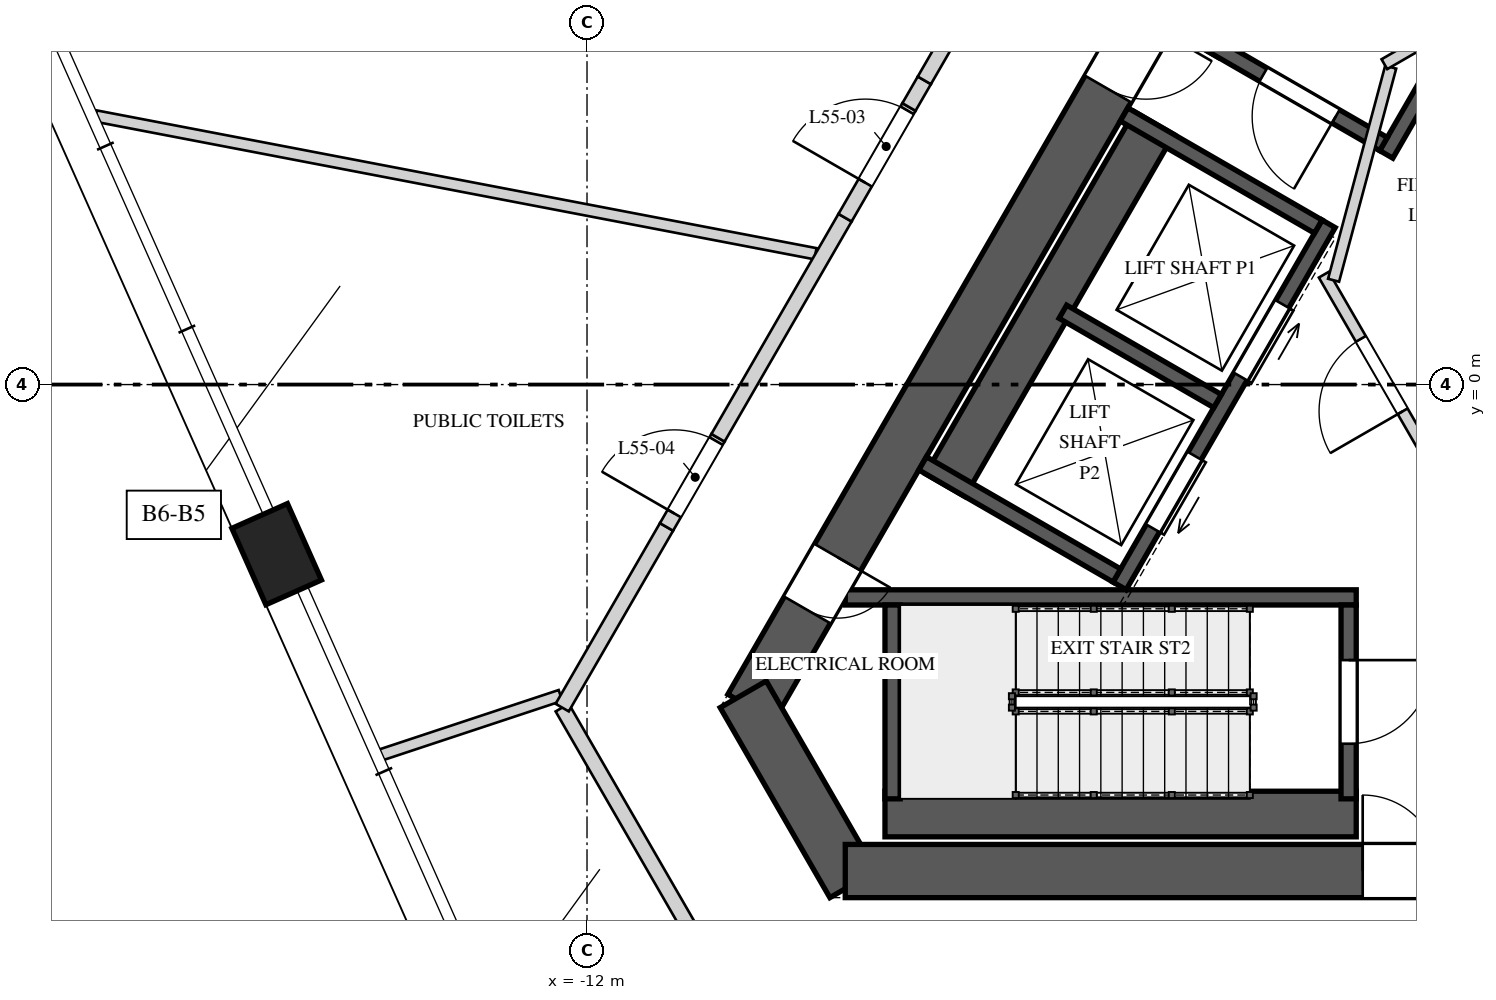
"""IFC4 building model, lengths in metres.
Left out: names, types, materials, properties, quantities, classifications, styles, units other than length and angle.
Written with IfcOpenShell. Run it as: python <this file> out.ifc"""

import sys

from ifc_helpers import new_model, si_unit, direction, frame, frame_2d, origin, origin_2d, place, context, subcontext, project, spatial, polyline, rectangle, outline, extrude, element, fill, save


model = new_model("IFC4")
c1 = context("Model", 3, precision=1e-05, world=origin(), true_north=direction((0.0, 1.0)))
c2 = subcontext(c1, "Body", "Model", "MODEL_VIEW")
j1 = project(units=[si_unit("LENGTHUNIT", "METRE"), si_unit("PLANEANGLEUNIT", "RADIAN")], contexts=[c1])
p1 = place(None, origin())
s1 = spatial("IfcSite", under=j1, at=p1, CompositionType="ELEMENT")
p2 = place(p1, origin())
s2 = spatial("IfcBuilding", under=s1, at=p2, CompositionType="ELEMENT")
p3 = place(p2, frame((0.0, 0.0, 237.2)))
s3 = spatial("IfcBuildingStorey", under=s2, at=p3, CompositionType="ELEMENT", Elevation=237.2)
p4 = place(p3, frame((-1.241, 10.65, 0.0), z_axis=(0.0, 0.0, 1.0), x_axis=(-0.500003331888, -0.866023480109, 0.0)))
e1 = element("IfcWall", 1, at=p4, inside=s3, PredefinedType="SHEAR", context=c2, shape_type="SweptSolid", body=[
    extrude(rectangle(XDim=17.205, YDim=0.7, at=frame_2d((8.603, 0.0))), origin(), (0.0, 0.0, 1.0), 4.0),
])
p5 = place(p4, frame((6.808, 0.0, 0.0)))
e2 = element("IfcOpeningElement", 2, at=p5, cuts=e1, PredefinedType="OPENING", context=c2, shape_type="SweptSolid", body=[
    extrude(rectangle(XDim=1.0, YDim=2.4, at=frame_2d((0.5, 1.2))), frame((0.0, 0.36, 0.0), z_axis=(0.0, -1.0, 0.0), x_axis=(1.0, 0.0, 0.0)), (0.0, 0.0, 1.0), 0.72),
])
p6 = place(p4, frame((14.922, 0.0, 0.0)))
e3 = element("IfcOpeningElement", 3, at=p6, cuts=e1, PredefinedType="OPENING", context=c2, shape_type="SweptSolid", body=[
    extrude(rectangle(XDim=0.8, YDim=2.1, at=frame_2d((0.4, 1.05))), frame((0.0, 0.36, 0.0), z_axis=(0.0, -1.0, 0.0), x_axis=(1.0, 0.0, 0.0)), (0.0, 0.0, 1.0), 0.72),
])
p7 = place(p3, frame((-9.945, -4.075, 0.0), z_axis=(0.0, 0.0, 1.0), x_axis=(0.499995765644, -0.866027848477, 0.0)))
e4 = element("IfcWall", 4, at=p7, inside=s3, PredefinedType="SHEAR", context=c2, shape_type="SweptSolid", body=[
    extrude(rectangle(XDim=2.887, YDim=0.7, at=frame_2d((1.443, 0.0))), origin(), (0.0, 0.0, 1.0), 4.0),
])
p8 = place(p3, frame((-8.603, -6.4, 0.0), z_axis=(0.0, 0.0, 1.0), x_axis=(1.0, 0.0, 0.0)))
e5 = element("IfcWall", 5, at=p8, inside=s3, PredefinedType="SHEAR", context=c2, shape_type="SweptSolid", body=[
    extrude(rectangle(XDim=17.205, YDim=0.7, at=frame_2d((8.603, 0.0))), origin(), (0.0, 0.0, 1.0), 4.0),
])
p9 = place(p8, frame((6.808, 0.0, 0.0)))
e6 = element("IfcOpeningElement", 6, at=p9, cuts=e5, PredefinedType="OPENING", context=c2, shape_type="SweptSolid", body=[
    extrude(rectangle(XDim=1.0, YDim=2.4, at=frame_2d((0.5, 1.2))), frame((0.0, 0.36, 0.0), z_axis=(0.0, -1.0, 0.0), x_axis=(1.0, 0.0, 0.0)), (0.0, 0.0, 1.0), 0.72),
])
p10 = place(p8, frame((14.922, 0.0, 0.0)))
e7 = element("IfcOpeningElement", 7, at=p10, cuts=e5, PredefinedType="OPENING", context=c2, shape_type="SweptSolid", body=[
    extrude(rectangle(XDim=0.8, YDim=2.1, at=frame_2d((0.4, 1.05))), frame((0.0, 0.36, 0.0), z_axis=(0.0, -1.0, 0.0), x_axis=(1.0, 0.0, 0.0)), (0.0, 0.0, 1.0), 0.72),
])
p11 = place(p3, frame((-16.083, -2.231, -0.35), z_axis=(0.0, 0.0, 1.0), x_axis=(0.406736643076, -0.913545457643, 0.0)))
e8 = element("IfcColumn", 8, at=p11, inside=s3, PredefinedType="COLUMN", context=c2, shape_type="SweptSolid", body=[
    extrude(rectangle(XDim=1.1, YDim=0.8, at=origin_2d()), origin(), (0.0, 0.0, 1.0), 4.35),
])
p12 = place(p3, frame((-0.853, 9.823, 0.0), z_axis=(0.0, 0.0, 1.0), x_axis=(-0.500009909098, -0.866019682689, 0.0)))
e9 = element("IfcWall", 9, at=p12, inside=s3, PredefinedType="SOLIDWALL", context=c2, shape_type="SweptSolid", body=[
    extrude(rectangle(XDim=6.2, YDim=0.6, at=frame_2d((3.1, 0.0))), origin(), (0.0, 0.0, 1.0), 3.65),
])
p13 = place(p3, frame((1.876, 8.85, 0.0), z_axis=(0.0, 0.0, 1.0), x_axis=(-0.499998042495, -0.866026533947, 0.0)))
e10 = element("IfcWall", 10, at=p13, inside=s3, PredefinedType="SOLIDWALL", context=c2, shape_type="SweptSolid", body=[
    extrude(rectangle(XDim=6.723, YDim=0.2, at=frame_2d((3.361, 0.0))), origin(), (0.0, 0.0, 1.0), 3.65),
])
p14 = place(p3, frame((-1.521, 3.165, 0.0), z_axis=(0.0, 0.0, 1.0), x_axis=(-0.866035871367, 0.499981869177, 0.0)))
e11 = element("IfcWall", 11, at=p14, inside=s3, PredefinedType="SOLIDWALL", context=c2, shape_type="SweptSolid", body=[
    extrude(rectangle(XDim=3.15, YDim=0.2, at=frame_2d((1.575, 0.0))), origin(), (0.0, 0.0, 1.0), 3.65),
])
p15 = place(p14, frame((0.725, 0.0, 0.0)))
e12 = element("IfcOpeningElement", 12, at=p15, cuts=e11, PredefinedType="OPENING", context=c2, shape_type="SweptSolid", body=[
    extrude(rectangle(XDim=1.1, YDim=2.4, at=frame_2d((0.55, 1.2))), frame((0.0, 0.11, 0.0), z_axis=(0.0, -1.0, 0.0), x_axis=(1.0, 0.0, 0.0)), (0.0, 0.0, 1.0), 0.22),
])
p16 = place(p3, frame((-8.08, -5.65, 0.0), z_axis=(0.0, 0.0, 1.0), x_axis=(1.0, 0.0, 0.0)))
e13 = element("IfcWall", 13, at=p16, inside=s3, PredefinedType="SOLIDWALL", context=c2, shape_type="SweptSolid", body=[
    extrude(rectangle(XDim=6.2, YDim=0.6, at=frame_2d((3.1, 0.0))), origin(), (0.0, 0.0, 1.0), 3.65),
])
p17 = place(p3, frame((-8.603, -2.8, 0.0), z_axis=(0.0, 0.0, 1.0), x_axis=(1.0, 0.0, 0.0)))
e14 = element("IfcWall", 14, at=p17, inside=s3, PredefinedType="SOLIDWALL", context=c2, shape_type="SweptSolid", body=[
    extrude(rectangle(XDim=6.723, YDim=0.2, at=frame_2d((3.361, 0.0))), origin(), (0.0, 0.0, 1.0), 3.65),
])
p18 = place(p3, frame((-7.98, -2.9, 0.0), z_axis=(0.0, 0.0, 1.0), x_axis=(0.0, -1.0, 0.0)))
e15 = element("IfcWall", 15, at=p18, inside=s3, PredefinedType="SOLIDWALL", context=c2, shape_type="SweptSolid", body=[
    extrude(rectangle(XDim=2.55, YDim=0.2, at=frame_2d((1.275, 0.0))), origin(), (0.0, 0.0, 1.0), 3.65),
])
p19 = place(p3, frame((-1.98, -2.9, 0.0), z_axis=(0.0, 0.0, 1.0), x_axis=(0.0, -1.0, 0.0)))
e16 = element("IfcWall", 16, at=p19, inside=s3, PredefinedType="SOLIDWALL", context=c2, shape_type="SweptSolid", body=[
    extrude(rectangle(XDim=2.55, YDim=0.2, at=frame_2d((1.275, 0.0))), origin(), (0.0, 0.0, 1.0), 3.65),
])
p20 = place(p19, frame((0.725, 0.0, 0.0)))
e17 = element("IfcOpeningElement", 17, at=p20, cuts=e16, PredefinedType="OPENING", context=c2, shape_type="SweptSolid", body=[
    extrude(rectangle(XDim=1.1, YDim=2.4, at=frame_2d((0.55, 1.2))), frame((0.0, 0.11, 0.0), z_axis=(0.0, -1.0, 0.0), x_axis=(1.0, 0.0, 0.0)), (0.0, 0.0, 1.0), 0.22),
])
p21 = place(p3, frame((-2.243, 2.115, 0.0), z_axis=(0.0, 0.0, 1.0), x_axis=(-0.499996545922, -0.866027397988, 0.0)))
e18 = element("IfcWall", 18, at=p21, inside=s3, PredefinedType="SOLIDWALL", context=c2, shape_type="SweptSolid", body=[
    extrude(rectangle(XDim=5.5, YDim=0.2, at=frame_2d((2.75, 0.0))), origin(), (0.0, 0.0, 1.0), 3.65),
])
p22 = place(p21, frame((1.22, 0.0, 0.0)))
e19 = element("IfcOpeningElement", 19, at=p22, cuts=e18, PredefinedType="OPENING", context=c2, shape_type="SweptSolid", body=[
    extrude(rectangle(XDim=1.1, YDim=2.1, at=frame_2d((0.55, 1.05))), frame((0.0, 0.11, 0.0), z_axis=(0.0, -1.0, 0.0), x_axis=(1.0, 0.0, 0.0)), (0.0, 0.0, 1.0), 0.22),
])
p23 = place(p21, frame((3.525, 0.0, 0.0)))
e20 = element("IfcOpeningElement", 20, at=p23, cuts=e18, PredefinedType="OPENING", context=c2, shape_type="SweptSolid", body=[
    extrude(rectangle(XDim=1.1, YDim=2.1, at=frame_2d((0.55, 1.05))), frame((0.0, 0.11, 0.0), z_axis=(0.0, -1.0, 0.0), x_axis=(1.0, 0.0, 0.0)), (0.0, 0.0, 1.0), 0.22),
])
p24 = place(p3, frame((-4.538, 3.44, 0.0), z_axis=(0.0, 0.0, 1.0), x_axis=(-0.499996545922, -0.866027397988, 0.0)))
e21 = element("IfcWall", 21, at=p24, inside=s3, PredefinedType="SOLIDWALL", context=c2, shape_type="SweptSolid", body=[
    extrude(rectangle(XDim=5.5, YDim=0.6, at=frame_2d((2.75, 0.0))), origin(), (0.0, 0.0, 1.0), 3.65),
])
p25 = place(p3, frame((-2.38, 2.078, 0.0), z_axis=(0.0, 0.0, 1.0), x_axis=(-0.866060182126, 0.499939757307, 0.0)))
e22 = element("IfcWall", 22, at=p25, inside=s3, PredefinedType="SOLIDWALL", context=c2, shape_type="SweptSolid", body=[
    extrude(rectangle(XDim=2.95, YDim=0.2, at=frame_2d((1.475, 0.0))), origin(), (0.0, 0.0, 1.0), 3.65),
])
p26 = place(p3, frame((-3.705, -0.217, 0.0), z_axis=(0.0, 0.0, 1.0), x_axis=(-0.866016039709, 0.500016218704, 0.0)))
e23 = element("IfcWall", 23, at=p26, inside=s3, PredefinedType="SOLIDWALL", context=c2, shape_type="SweptSolid", body=[
    extrude(rectangle(XDim=2.35, YDim=0.2, at=frame_2d((1.175, 0.0))), origin(), (0.0, 0.0, 1.0), 3.65),
])
p27 = place(p3, frame((-5.03, -2.512, 0.0), z_axis=(0.0, 0.0, 1.0), x_axis=(-0.866003658127, 0.500037662692, 0.0)))
e24 = element("IfcWall", 24, at=p27, inside=s3, PredefinedType="SOLIDWALL", context=c2, shape_type="SweptSolid", body=[
    extrude(rectangle(XDim=2.95, YDim=0.2, at=frame_2d((1.475, 0.0))), origin(), (0.0, 0.0, 1.0), 3.65),
])
p28 = place(p3, frame((-0.744, -1.261, 0.0), z_axis=(0.0, 0.0, 1.0), x_axis=(-0.500004234368, 0.866022959057, 0.0)))
e25 = element("IfcWall", 25, at=p28, inside=s3, PredefinedType="PARTITIONING", context=c2, shape_type="SweptSolid", body=[
    extrude(rectangle(XDim=3.125, YDim=0.15, at=frame_2d((1.562, 0.0))), origin(), (0.0, 0.0, 1.0), 3.65),
])
p29 = place(p28, frame((1.05, 0.0, 0.0)))
e26 = element("IfcOpeningElement", 26, at=p29, cuts=e25, PredefinedType="OPENING", context=c2, shape_type="SweptSolid", body=[
    extrude(rectangle(XDim=1.1, YDim=2.4, at=frame_2d((0.55, 1.2))), frame((0.0, 0.085, 0.0), z_axis=(0.0, -1.0, 0.0), x_axis=(1.0, 0.0, 0.0)), (0.0, 0.0, 1.0), 0.17),
])
p30 = place(p3, frame((-2.178, 1.372, 0.0), z_axis=(0.0, 0.0, 1.0), x_axis=(0.258808958833, 0.96592852884, 0.0)))
e27 = element("IfcWall", 27, at=p30, inside=s3, PredefinedType="PARTITIONING", context=c2, shape_type="SweptSolid", body=[
    extrude(rectangle(XDim=2.903, YDim=0.15, at=frame_2d((1.451, 0.0))), origin(), (0.0, 0.0, 1.0), 3.65),
])
p31 = place(p3, frame((-1.51, 4.215, 0.0), z_axis=(0.0, 0.0, 1.0), x_axis=(0.866085525409, 0.49989585183, 0.0)))
e28 = element("IfcWall", 28, at=p31, inside=s3, PredefinedType="PARTITIONING", context=c2, shape_type="SweptSolid", body=[
    extrude(rectangle(XDim=1.3, YDim=0.15, at=frame_2d((0.65, 0.0))), origin(), (0.0, 0.0, 1.0), 3.65),
])
p32 = place(p3, frame((-12.349, -4.09, 0.0), z_axis=(0.0, 0.0, 1.0), x_axis=(-0.949316867491, -0.314320672398, 0.0)))
e29 = element("IfcWall", 29, at=p32, inside=s3, PredefinedType="PARTITIONING", context=c2, shape_type="SweptSolid", body=[
    extrude(rectangle(XDim=2.497, YDim=0.15, at=frame_2d((1.249, 0.0))), origin(), (0.0, 0.0, 1.0), 3.65),
])
p33 = place(p3, frame((-8.994, 1.721, 0.0), z_axis=(0.0, 0.0, 1.0), x_axis=(-0.982177280281, 0.187956883618, 0.0)))
e30 = element("IfcWall", 30, at=p33, inside=s3, PredefinedType="PARTITIONING", context=c2, shape_type="SweptSolid", body=[
    extrude(rectangle(XDim=9.641, YDim=0.15, at=frame_2d((4.82, 0.0))), origin(), (0.0, 0.0, 1.0), 3.65),
])
p34 = place(p3, frame((-10.123, -8.067, 0.0), z_axis=(0.0, 0.0, 1.0), x_axis=(-0.500005339912, 0.866022320763, 0.0)))
e31 = element("IfcWall", 31, at=p34, inside=s3, PredefinedType="SOLIDWALL", context=c2, shape_type="SweptSolid", body=[
    extrude(rectangle(XDim=4.408, YDim=0.2, at=frame_2d((2.204, 0.0))), origin(), (0.0, 0.0, 1.0), 3.65),
])
p35 = place(p3, frame((-12.326, -4.25, 0.0), z_axis=(0.0, 0.0, 1.0), x_axis=(0.499994514761, 0.866028570666, 0.0)))
e32 = element("IfcWall", 32, at=p35, inside=s3, PredefinedType="SOLIDWALL", context=c2, shape_type="SweptSolid", body=[
    extrude(rectangle(XDim=2.745, YDim=0.2, at=frame_2d((1.372, 0.0))), origin(), (0.0, 0.0, 1.0), 3.65),
])
p36 = place(p3, frame((-10.954, -1.873, 0.0), z_axis=(0.0, 0.0, 1.0), x_axis=(0.500034408226, 0.866005537274, 0.0)))
e33 = element("IfcWall", 33, at=p36, inside=s3, PredefinedType="SOLIDWALL", context=c2, shape_type="SweptSolid", body=[
    extrude(outline(polyline([(0.0, 0.0), (1.355, 0.0), (1.355, 3.65), (0.887, 3.65), (0.887, 2.95), (0.0, 2.95), (0.0, 0.0)])), frame((0.0, 0.1, 0.0), z_axis=(0.0, -1.0, 0.0), x_axis=(1.0, 0.0, 0.0)), (0.0, 0.0, 1.0), 0.2),
])
p37 = place(p36, frame((0.205, 0.0, 0.0)))
e34 = element("IfcOpeningElement", 34, at=p37, cuts=e33, PredefinedType="OPENING", context=c2, shape_type="SweptSolid", body=[
    extrude(rectangle(XDim=1.1, YDim=2.4, at=frame_2d((0.55, 1.2))), frame((0.0, 0.11, 0.0), z_axis=(0.0, -1.0, 0.0), x_axis=(1.0, 0.0, 0.0)), (0.0, 0.0, 1.0), 0.22),
])
p38 = place(p3, frame((-10.277, -0.7, 0.0), z_axis=(0.0, 0.0, 1.0), x_axis=(0.499987977232, 0.866032345022, 0.0)))
e35 = element("IfcWall", 35, at=p38, inside=s3, PredefinedType="SOLIDWALL", context=c2, shape_type="SweptSolid", body=[
    extrude(rectangle(XDim=3.343, YDim=0.2, at=frame_2d((1.671, 0.0))), origin(), (0.0, 0.0, 1.0), 3.65),
])
p39 = place(p3, frame((-8.605, 2.195, 0.0), z_axis=(0.0, 0.0, 1.0), x_axis=(0.499948642682, 0.866055052915, 0.0)))
e36 = element("IfcWall", 36, at=p39, inside=s3, PredefinedType="SOLIDWALL", context=c2, shape_type="SweptSolid", body=[
    extrude(outline(polyline([(0.0, 0.0), (1.682, 0.0), (1.682, 3.65), (0.821, 3.65), (0.821, 2.75), (0.0, 2.75), (0.0, 0.0)])), frame((0.0, 0.1, 0.0), z_axis=(0.0, -1.0, 0.0), x_axis=(1.0, 0.0, 0.0)), (0.0, 0.0, 1.0), 0.2),
])
p40 = place(p39, frame((0.532, 0.0, 0.0)))
e37 = element("IfcOpeningElement", 37, at=p40, cuts=e36, PredefinedType="OPENING", context=c2, shape_type="SweptSolid", body=[
    extrude(rectangle(XDim=1.1, YDim=2.4, at=frame_2d((0.55, 1.2))), frame((0.0, 0.11, 0.0), z_axis=(0.0, -1.0, 0.0), x_axis=(1.0, 0.0, 0.0)), (0.0, 0.0, 1.0), 0.22),
])
p41 = place(p3, frame((-7.764, 3.652, 0.0), z_axis=(0.0, 0.0, 1.0), x_axis=(0.500227331437, 0.865894114129, 0.0)))
e38 = element("IfcWall", 38, at=p41, inside=s3, PredefinedType="SOLIDWALL", context=c2, shape_type="SweptSolid", body=[
    extrude(rectangle(XDim=0.405, YDim=0.2, at=frame_2d((0.202, 0.0))), origin(), (0.0, 0.0, 1.0), 3.65),
])
p42 = place(p3, frame((-7.562, 4.002, 0.0), z_axis=(0.0, 0.0, 1.0), x_axis=(0.500105887137, 0.865964261186, 0.0)))
e39 = element("IfcWall", 39, at=p42, inside=s3, PredefinedType="SOLIDWALL", context=c2, shape_type="SweptSolid", body=[
    extrude(rectangle(XDim=0.9, YDim=0.2, at=frame_2d((0.45, 0.0))), origin(), (0.0, 0.0, 1.0), 2.55),
])
p43 = place(p15, origin())
e40 = element("IfcDoor", 40, at=p43, inside=s3, OperationType="SINGLE_SWING_RIGHT", PredefinedType="DOOR", context=c2, shape_type="SweptSolid", body=[
    extrude(rectangle(XDim=1.1, YDim=2.4, at=frame_2d((0.55, 1.2))), frame((0.0, 0.025, 0.0), z_axis=(0.0, -1.0, 0.0), x_axis=(1.0, 0.0, 0.0)), (0.0, 0.0, 1.0), 0.05),
])
fill(e12, e40)
p44 = place(p20, origin())
e41 = element("IfcDoor", 41, at=p44, inside=s3, OperationType="SINGLE_SWING_LEFT", PredefinedType="DOOR", context=c2, shape_type="SweptSolid", body=[
    extrude(rectangle(XDim=1.1, YDim=2.4, at=frame_2d((0.55, 1.2))), frame((0.0, 0.025, 0.0), z_axis=(0.0, -1.0, 0.0), x_axis=(1.0, 0.0, 0.0)), (0.0, 0.0, 1.0), 0.05),
])
fill(e17, e41)
p45 = place(p22, origin())
e42 = element("IfcDoor", 42, at=p45, inside=s3, OperationType="SLIDING_TO_LEFT", PredefinedType="DOOR", context=c2, shape_type="SweptSolid", body=[
    extrude(rectangle(XDim=1.1, YDim=2.1, at=frame_2d((0.55, 1.05))), frame((0.0, 0.025, 0.0), z_axis=(0.0, -1.0, 0.0), x_axis=(1.0, 0.0, 0.0)), (0.0, 0.0, 1.0), 0.05),
])
fill(e19, e42)
p46 = place(p23, origin())
e43 = element("IfcDoor", 43, at=p46, inside=s3, OperationType="SLIDING_TO_RIGHT", PredefinedType="DOOR", context=c2, shape_type="SweptSolid", body=[
    extrude(rectangle(XDim=1.1, YDim=2.1, at=frame_2d((0.55, 1.05))), frame((0.0, 0.025, 0.0), z_axis=(0.0, -1.0, 0.0), x_axis=(1.0, 0.0, 0.0)), (0.0, 0.0, 1.0), 0.05),
])
fill(e20, e43)
p47 = place(p29, origin())
e44 = element("IfcDoor", 44, at=p47, inside=s3, OperationType="SINGLE_SWING_LEFT", PredefinedType="DOOR", context=c2, shape_type="SweptSolid", body=[
    extrude(rectangle(XDim=1.1, YDim=2.4, at=frame_2d((0.55, 1.2))), frame((0.0, 0.025, 0.0), z_axis=(0.0, -1.0, 0.0), x_axis=(1.0, 0.0, 0.0)), (0.0, 0.0, 1.0), 0.05),
])
fill(e26, e44)
p48 = place(p5, origin())
e45 = element("IfcDoor", 45, at=p48, inside=s3, OperationType="SINGLE_SWING_RIGHT", PredefinedType="DOOR", context=c2, shape_type="SweptSolid", body=[
    extrude(rectangle(XDim=1.0, YDim=2.4, at=frame_2d((0.5, 1.2))), frame((0.0, 0.025, 0.0), z_axis=(0.0, -1.0, 0.0), x_axis=(1.0, 0.0, 0.0)), (0.0, 0.0, 1.0), 0.05),
])
fill(e2, e45)
p49 = place(p9, origin())
e46 = element("IfcDoor", 46, at=p49, inside=s3, OperationType="SINGLE_SWING_LEFT", PredefinedType="DOOR", context=c2, shape_type="SweptSolid", body=[
    extrude(rectangle(XDim=1.0, YDim=2.4, at=frame_2d((0.5, 1.2))), frame((0.0, 0.025, 0.0), z_axis=(0.0, -1.0, 0.0), x_axis=(1.0, 0.0, 0.0)), (0.0, 0.0, 1.0), 0.05),
])
fill(e6, e46)
p50 = place(p6, origin())
e47 = element("IfcDoor", 47, at=p50, inside=s3, OperationType="SINGLE_SWING_LEFT", PredefinedType="DOOR", context=c2, shape_type="SweptSolid", body=[
    extrude(rectangle(XDim=0.8, YDim=2.1, at=frame_2d((0.4, 1.05))), frame((0.0, 0.025, 0.0), z_axis=(0.0, -1.0, 0.0), x_axis=(1.0, 0.0, 0.0)), (0.0, 0.0, 1.0), 0.05),
])
fill(e3, e47)
p51 = place(p40, origin())
e48 = element("IfcDoor", 48, at=p51, inside=s3, OperationType="SINGLE_SWING_LEFT", PredefinedType="DOOR", context=c2, shape_type="SweptSolid", body=[
    extrude(rectangle(XDim=1.1, YDim=2.4, at=frame_2d((0.55, 1.2))), frame((0.0, 0.025, 0.0), z_axis=(0.0, -1.0, 0.0), x_axis=(1.0, 0.0, 0.0)), (0.0, 0.0, 1.0), 0.05),
])
fill(e37, e48)
p52 = place(p37, origin())
e49 = element("IfcDoor", 49, at=p52, inside=s3, OperationType="SINGLE_SWING_RIGHT", PredefinedType="DOOR", context=c2, shape_type="SweptSolid", body=[
    extrude(rectangle(XDim=1.1, YDim=2.4, at=frame_2d((0.55, 1.2))), frame((0.0, 0.025, 0.0), z_axis=(0.0, -1.0, 0.0), x_axis=(1.0, 0.0, 0.0)), (0.0, 0.0, 1.0), 0.05),
])
fill(e34, e49)
save(model, sys.argv[1])
